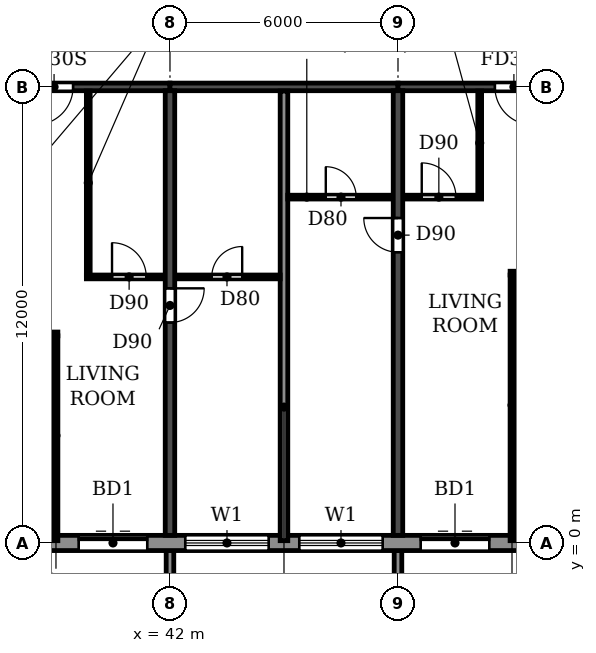
"""IFC4 building model, lengths in metres.
Left out: names, types, materials, properties, quantities, classifications, styles, units other than length and angle.
Written with IfcOpenShell. Run it as: python <this file> out.ifc"""

import sys

from ifc_helpers import new_model, si_unit, direction, frame, frame_2d, origin, place, context, subcontext, project, spatial, polyline, rectangle, outline, extrude, source, transform, mapped, element, fill, save


model = new_model("IFC4")
c1 = context("Model", 3, precision=1e-05, world=origin(), true_north=direction((0.0, 1.0)))
c2 = subcontext(c1, "Body", "Model", "MODEL_VIEW")
j1 = project(units=[si_unit("LENGTHUNIT", "METRE"), si_unit("PLANEANGLEUNIT", "RADIAN")], contexts=[c1])
p1 = place(None, origin())
s1 = spatial("IfcSite", under=j1, at=p1, CompositionType="ELEMENT")
p2 = place(p1, origin())
s2 = spatial("IfcBuilding", under=s1, at=p2, CompositionType="ELEMENT")
p3 = place(p2, frame((0.0, 0.0, 221.4)))
s3 = spatial("IfcBuildingStorey", under=s2, at=p3, CompositionType="ELEMENT", Elevation=221.4)
p4 = place(p3, frame((42.0, 0.2, 0.0), z_axis=(0.0, 0.0, 1.0), x_axis=(0.0, 1.0, 0.0)))
e1 = element("IfcWall", 1, at=p4, inside=s3, PredefinedType="SHEAR", context=c2, shape_type="SweptSolid", body=[
    extrude(rectangle(XDim=11.7, YDim=0.25, at=frame_2d((5.85, 0.0))), origin(), (0.0, 0.0, 1.0), 3.08),
])
p5 = place(p4, frame((5.6, 0.0, 0.0)))
e2 = element("IfcOpeningElement", 2, at=p5, cuts=e1, PredefinedType="OPENING", context=c2, shape_type="SweptSolid", body=[
    extrude(rectangle(XDim=0.9, YDim=2.1, at=frame_2d((0.45, 1.05))), frame((0.0, 0.135, 0.0), z_axis=(0.0, -1.0, 0.0), x_axis=(1.0, 0.0, 0.0)), (0.0, 0.0, 1.0), 0.27),
])
p6 = place(p3, frame((48.0, 0.2, 0.0), z_axis=(0.0, 0.0, 1.0), x_axis=(0.0, 1.0, 0.0)))
e3 = element("IfcWall", 3, at=p6, inside=s3, PredefinedType="SHEAR", context=c2, shape_type="SweptSolid", body=[
    extrude(rectangle(XDim=11.7, YDim=0.25, at=frame_2d((5.85, 0.0))), origin(), (0.0, 0.0, 1.0), 3.08),
])
p7 = place(p6, frame((7.45, 0.0, 0.0)))
e4 = element("IfcOpeningElement", 4, at=p7, cuts=e3, PredefinedType="OPENING", context=c2, shape_type="SweptSolid", body=[
    extrude(rectangle(XDim=0.9, YDim=2.1, at=frame_2d((0.45, 1.05))), frame((0.0, 0.135, 0.0), z_axis=(0.0, -1.0, 0.0), x_axis=(1.0, 0.0, 0.0)), (0.0, 0.0, 1.0), 0.27),
])
p8 = place(p3, frame((36.0, 12.0, 0.0), z_axis=(0.0, 0.0, 1.0), x_axis=(1.0, 0.0, 0.0)))
e5 = element("IfcWall", 5, at=p8, inside=s3, PredefinedType="SHEAR", context=c2, shape_type="SweptSolid", body=[
    extrude(rectangle(XDim=6.0, YDim=0.2, at=frame_2d((3.0, 0.0))), origin(), (0.0, 0.0, 1.0), 2.48),
])
p9 = place(p8, frame((2.45, 0.0, 0.0)))
e6 = element("IfcOpeningElement", 6, at=p9, cuts=e5, PredefinedType="OPENING", context=c2, shape_type="SweptSolid", body=[
    extrude(rectangle(XDim=1.0, YDim=2.1, at=frame_2d((0.5, 1.05))), frame((0.0, 0.11, 0.0), z_axis=(0.0, -1.0, 0.0), x_axis=(1.0, 0.0, 0.0)), (0.0, 0.0, 1.0), 0.22),
])
p10 = place(p3, frame((42.0, 12.0, 0.0), z_axis=(0.0, 0.0, 1.0), x_axis=(1.0, 0.0, 0.0)))
e7 = element("IfcWall", 7, at=p10, inside=s3, PredefinedType="SHEAR", context=c2, shape_type="SweptSolid", body=[
    extrude(rectangle(XDim=6.0, YDim=0.2, at=frame_2d((3.0, 0.0))), origin(), (0.0, 0.0, 1.0), 2.48),
])
p11 = place(p3, frame((48.0, 12.0, 0.0), z_axis=(0.0, 0.0, 1.0), x_axis=(1.0, 0.0, 0.0)))
e8 = element("IfcWall", 8, at=p11, inside=s3, PredefinedType="SHEAR", context=c2, shape_type="SweptSolid", body=[
    extrude(rectangle(XDim=6.0, YDim=0.2, at=frame_2d((3.0, 0.0))), origin(), (0.0, 0.0, 1.0), 2.48),
])
p12 = place(p11, frame((2.55, 0.0, 0.0)))
e9 = element("IfcOpeningElement", 9, at=p12, cuts=e8, PredefinedType="OPENING", context=c2, shape_type="SweptSolid", body=[
    extrude(rectangle(XDim=1.0, YDim=2.1, at=frame_2d((0.5, 1.05))), frame((0.0, 0.11, 0.0), z_axis=(0.0, -1.0, 0.0), x_axis=(1.0, 0.0, 0.0)), (0.0, 0.0, 1.0), 0.22),
])
p13 = place(p3, frame((22.683, 0.0, 0.0), z_axis=(0.0, 0.0, 1.0), x_axis=(1.0, 0.0, 0.0)))
e10 = element("IfcWall", 10, at=p13, inside=s3, PredefinedType="STANDARD", context=c2, shape_type="SweptSolid", body=[
    extrude(rectangle(XDim=56.634, YDim=0.4, at=frame_2d((28.317, 0.0))), origin(), (0.0, 0.0, 1.0), 3.08),
])
p14 = place(p13, frame((1.717, 0.0, 0.9)))
e11 = element("IfcOpeningElement", 11, at=p14, cuts=e10, PredefinedType="OPENING", context=c2, shape_type="SweptSolid", body=[
    extrude(rectangle(XDim=2.2, YDim=1.5, at=frame_2d((1.1, 0.75))), frame((0.0, 0.21, 0.0), z_axis=(0.0, -1.0, 0.0), x_axis=(1.0, 0.0, 0.0)), (0.0, 0.0, 1.0), 0.42),
])
p15 = place(p13, frame((4.917, 0.0, 0.0)))
e12 = element("IfcOpeningElement", 12, at=p15, cuts=e10, PredefinedType="OPENING", context=c2, shape_type="SweptSolid", body=[
    extrude(rectangle(XDim=1.8, YDim=2.4, at=frame_2d((0.9, 1.2))), frame((0.0, 0.21, 0.0), z_axis=(0.0, -1.0, 0.0), x_axis=(1.0, 0.0, 0.0)), (0.0, 0.0, 1.0), 0.42),
])
p16 = place(p13, frame((7.717, 0.0, 0.9)))
e13 = element("IfcOpeningElement", 13, at=p16, cuts=e10, PredefinedType="OPENING", context=c2, shape_type="SweptSolid", body=[
    extrude(rectangle(XDim=2.2, YDim=1.5, at=frame_2d((1.1, 0.75))), frame((0.0, 0.21, 0.0), z_axis=(0.0, -1.0, 0.0), x_axis=(1.0, 0.0, 0.0)), (0.0, 0.0, 1.0), 0.42),
])
p17 = place(p13, frame((10.717, 0.0, 0.9)))
e14 = element("IfcOpeningElement", 14, at=p17, cuts=e10, PredefinedType="OPENING", context=c2, shape_type="SweptSolid", body=[
    extrude(rectangle(XDim=2.2, YDim=1.5, at=frame_2d((1.1, 0.75))), frame((0.0, 0.21, 0.0), z_axis=(0.0, -1.0, 0.0), x_axis=(1.0, 0.0, 0.0)), (0.0, 0.0, 1.0), 0.42),
])
p18 = place(p13, frame((13.717, 0.0, 0.9)))
e15 = element("IfcOpeningElement", 15, at=p18, cuts=e10, PredefinedType="OPENING", context=c2, shape_type="SweptSolid", body=[
    extrude(rectangle(XDim=2.2, YDim=1.5, at=frame_2d((1.1, 0.75))), frame((0.0, 0.21, 0.0), z_axis=(0.0, -1.0, 0.0), x_axis=(1.0, 0.0, 0.0)), (0.0, 0.0, 1.0), 0.42),
])
p19 = place(p13, frame((16.917, 0.0, 0.0)))
e16 = element("IfcOpeningElement", 16, at=p19, cuts=e10, PredefinedType="OPENING", context=c2, shape_type="SweptSolid", body=[
    extrude(rectangle(XDim=1.8, YDim=2.4, at=frame_2d((0.9, 1.2))), frame((0.0, 0.21, 0.0), z_axis=(0.0, -1.0, 0.0), x_axis=(1.0, 0.0, 0.0)), (0.0, 0.0, 1.0), 0.42),
])
p20 = place(p13, frame((19.717, 0.0, 0.9)))
e17 = element("IfcOpeningElement", 17, at=p20, cuts=e10, PredefinedType="OPENING", context=c2, shape_type="SweptSolid", body=[
    extrude(rectangle(XDim=2.2, YDim=1.5, at=frame_2d((1.1, 0.75))), frame((0.0, 0.21, 0.0), z_axis=(0.0, -1.0, 0.0), x_axis=(1.0, 0.0, 0.0)), (0.0, 0.0, 1.0), 0.42),
])
p21 = place(p13, frame((22.717, 0.0, 0.9)))
e18 = element("IfcOpeningElement", 18, at=p21, cuts=e10, PredefinedType="OPENING", context=c2, shape_type="SweptSolid", body=[
    extrude(rectangle(XDim=2.2, YDim=1.5, at=frame_2d((1.1, 0.75))), frame((0.0, 0.21, 0.0), z_axis=(0.0, -1.0, 0.0), x_axis=(1.0, 0.0, 0.0)), (0.0, 0.0, 1.0), 0.42),
])
p22 = place(p13, frame((25.917, 0.0, 0.0)))
e19 = element("IfcOpeningElement", 19, at=p22, cuts=e10, PredefinedType="OPENING", context=c2, shape_type="SweptSolid", body=[
    extrude(rectangle(XDim=1.8, YDim=2.4, at=frame_2d((0.9, 1.2))), frame((0.0, 0.21, 0.0), z_axis=(0.0, -1.0, 0.0), x_axis=(1.0, 0.0, 0.0)), (0.0, 0.0, 1.0), 0.42),
])
p23 = place(p13, frame((28.717, 0.0, 0.9)))
e20 = element("IfcOpeningElement", 20, at=p23, cuts=e10, PredefinedType="OPENING", context=c2, shape_type="SweptSolid", body=[
    extrude(rectangle(XDim=2.2, YDim=1.5, at=frame_2d((1.1, 0.75))), frame((0.0, 0.21, 0.0), z_axis=(0.0, -1.0, 0.0), x_axis=(1.0, 0.0, 0.0)), (0.0, 0.0, 1.0), 0.42),
])
p24 = place(p13, frame((31.717, 0.0, 0.9)))
e21 = element("IfcOpeningElement", 21, at=p24, cuts=e10, PredefinedType="OPENING", context=c2, shape_type="SweptSolid", body=[
    extrude(rectangle(XDim=2.2, YDim=1.5, at=frame_2d((1.1, 0.75))), frame((0.0, 0.21, 0.0), z_axis=(0.0, -1.0, 0.0), x_axis=(1.0, 0.0, 0.0)), (0.0, 0.0, 1.0), 0.42),
])
p25 = place(p13, frame((34.717, 0.0, 0.9)))
e22 = element("IfcOpeningElement", 22, at=p25, cuts=e10, PredefinedType="OPENING", context=c2, shape_type="SweptSolid", body=[
    extrude(rectangle(XDim=2.2, YDim=1.5, at=frame_2d((1.1, 0.75))), frame((0.0, 0.21, 0.0), z_axis=(0.0, -1.0, 0.0), x_axis=(1.0, 0.0, 0.0)), (0.0, 0.0, 1.0), 0.42),
])
p26 = place(p13, frame((37.917, 0.0, 0.0)))
e23 = element("IfcOpeningElement", 23, at=p26, cuts=e10, PredefinedType="OPENING", context=c2, shape_type="SweptSolid", body=[
    extrude(rectangle(XDim=1.8, YDim=2.4, at=frame_2d((0.9, 1.2))), frame((0.0, 0.21, 0.0), z_axis=(0.0, -1.0, 0.0), x_axis=(1.0, 0.0, 0.0)), (0.0, 0.0, 1.0), 0.42),
])
p27 = place(p13, frame((40.717, 0.0, 0.9)))
e24 = element("IfcOpeningElement", 24, at=p27, cuts=e10, PredefinedType="OPENING", context=c2, shape_type="SweptSolid", body=[
    extrude(rectangle(XDim=2.2, YDim=1.5, at=frame_2d((1.1, 0.75))), frame((0.0, 0.21, 0.0), z_axis=(0.0, -1.0, 0.0), x_axis=(1.0, 0.0, 0.0)), (0.0, 0.0, 1.0), 0.42),
])
p28 = place(p13, frame((43.717, 0.0, 0.9)))
e25 = element("IfcOpeningElement", 25, at=p28, cuts=e10, PredefinedType="OPENING", context=c2, shape_type="SweptSolid", body=[
    extrude(rectangle(XDim=2.2, YDim=1.5, at=frame_2d((1.1, 0.75))), frame((0.0, 0.21, 0.0), z_axis=(0.0, -1.0, 0.0), x_axis=(1.0, 0.0, 0.0)), (0.0, 0.0, 1.0), 0.42),
])
p29 = place(p13, frame((46.717, 0.0, 0.9)))
e26 = element("IfcOpeningElement", 26, at=p29, cuts=e10, PredefinedType="OPENING", context=c2, shape_type="SweptSolid", body=[
    extrude(rectangle(XDim=2.2, YDim=1.5, at=frame_2d((1.1, 0.75))), frame((0.0, 0.21, 0.0), z_axis=(0.0, -1.0, 0.0), x_axis=(1.0, 0.0, 0.0)), (0.0, 0.0, 1.0), 0.42),
])
p30 = place(p13, frame((49.917, 0.0, 0.0)))
e27 = element("IfcOpeningElement", 27, at=p30, cuts=e10, PredefinedType="OPENING", context=c2, shape_type="SweptSolid", body=[
    extrude(rectangle(XDim=1.8, YDim=2.4, at=frame_2d((0.9, 1.2))), frame((0.0, 0.21, 0.0), z_axis=(0.0, -1.0, 0.0), x_axis=(1.0, 0.0, 0.0)), (0.0, 0.0, 1.0), 0.42),
])
p31 = place(p13, frame((52.717, 0.0, 0.9)))
e28 = element("IfcOpeningElement", 28, at=p31, cuts=e10, PredefinedType="OPENING", context=c2, shape_type="SweptSolid", body=[
    extrude(rectangle(XDim=2.2, YDim=1.5, at=frame_2d((1.1, 0.75))), frame((0.0, 0.21, 0.0), z_axis=(0.0, -1.0, 0.0), x_axis=(1.0, 0.0, 0.0)), (0.0, 0.0, 1.0), 0.42),
])
m1 = source(origin(), c2, "Body", "SweptSolid", [
    extrude(outline(polyline([(0.0, 0.0), (0.2, 0.0), (0.2, 1.65), (0.0, 1.65), (0.0, 0.0)])), origin(), (0.0, 0.0, 1.0), 3.1),
])
for number, where in (
    (29, (41.9, -1.85, 0.0)),
    (30, (47.9, -1.85, 0.0)),
):
    element("IfcWall", number, at=place(p3, frame(where)), inside=s3, PredefinedType="STANDARD", context=c2, shape_type="MappedRepresentation", body=[
        mapped(m1, transform((0.0, 0.0, 0.0))),
    ])
p32 = place(p3, frame((45.0, 0.06, 0.0), z_axis=(0.0, 0.0, 1.0), x_axis=(0.0, 1.0, 0.0)))
e31 = element("IfcWall", 31, at=p32, inside=s3, PredefinedType="PARTITIONING", context=c2, shape_type="SweptSolid", body=[
    extrude(rectangle(XDim=11.83, YDim=0.2, at=frame_2d((5.915, 0.0))), origin(), (0.0, 0.0, 1.0), 3.08),
])
p33 = place(p3, frame((36.135, 5.5, 0.0), z_axis=(0.0, 0.0, 1.0), x_axis=(1.0, 0.0, 0.0)))
e32 = element("IfcWall", 32, at=p33, inside=s3, PredefinedType="PARTITIONING", context=c2, shape_type="SweptSolid", body=[
    extrude(rectangle(XDim=2.915, YDim=0.1, at=frame_2d((1.458, 0.0))), origin(), (0.0, 0.0, 1.0), 3.08),
])
p34 = place(p33, frame((1.465, 0.0, 0.0)))
e33 = element("IfcOpeningElement", 33, at=p34, cuts=e32, PredefinedType="OPENING", context=c2, shape_type="SweptSolid", body=[
    extrude(rectangle(XDim=0.9, YDim=2.1, at=frame_2d((0.45, 1.05))), frame((0.0, 0.06, 0.0), z_axis=(0.0, -1.0, 0.0), x_axis=(1.0, 0.0, 0.0)), (0.0, 0.0, 1.0), 0.12),
])
p35 = place(p3, frame((39.8, 7.0, 0.0), z_axis=(0.0, 0.0, 1.0), x_axis=(1.0, 0.0, 0.0)))
e34 = element("IfcWall", 34, at=p35, inside=s3, PredefinedType="PARTITIONING", context=c2, shape_type="SweptSolid", body=[
    extrude(rectangle(XDim=2.065, YDim=0.1, at=frame_2d((1.032, 0.0))), origin(), (0.0, 0.0, 1.0), 3.08),
])
p36 = place(p35, frame((0.675, 0.0, 0.0)))
e35 = element("IfcOpeningElement", 35, at=p36, cuts=e34, PredefinedType="OPENING", context=c2, shape_type="SweptSolid", body=[
    extrude(rectangle(XDim=0.9, YDim=2.1, at=frame_2d((0.45, 1.05))), frame((0.0, 0.06, 0.0), z_axis=(0.0, -1.0, 0.0), x_axis=(1.0, 0.0, 0.0)), (0.0, 0.0, 1.0), 0.12),
])
p37 = place(p3, frame((42.135, 7.0, 0.0), z_axis=(0.0, 0.0, 1.0), x_axis=(1.0, 0.0, 0.0)))
e36 = element("IfcWall", 36, at=p37, inside=s3, PredefinedType="PARTITIONING", context=c2, shape_type="SweptSolid", body=[
    extrude(rectangle(XDim=2.765, YDim=0.1, at=frame_2d((1.382, 0.0))), origin(), (0.0, 0.0, 1.0), 3.08),
])
p38 = place(p37, frame((0.965, 0.0, 0.0)))
e37 = element("IfcOpeningElement", 37, at=p38, cuts=e36, PredefinedType="OPENING", context=c2, shape_type="SweptSolid", body=[
    extrude(rectangle(XDim=0.8, YDim=2.1, at=frame_2d((0.4, 1.05))), frame((0.0, 0.06, 0.0), z_axis=(0.0, -1.0, 0.0), x_axis=(1.0, 0.0, 0.0)), (0.0, 0.0, 1.0), 0.12),
])
p39 = place(p3, frame((50.95, 7.1, 0.0), z_axis=(0.0, 0.0, 1.0), x_axis=(1.0, 0.0, 0.0)))
e38 = element("IfcWall", 38, at=p39, inside=s3, PredefinedType="PARTITIONING", context=c2, shape_type="SweptSolid", body=[
    extrude(rectangle(XDim=2.915, YDim=0.1, at=frame_2d((1.458, 0.0))), origin(), (0.0, 0.0, 1.0), 3.08),
])
p40 = place(p39, frame((1.65, 0.0, 0.0)))
e39 = element("IfcOpeningElement", 39, at=p40, cuts=e38, PredefinedType="OPENING", context=c2, shape_type="SweptSolid", body=[
    extrude(rectangle(XDim=0.9, YDim=2.1, at=frame_2d((0.45, 1.05))), frame((0.0, 0.06, 0.0), z_axis=(0.0, -1.0, 0.0), x_axis=(1.0, 0.0, 0.0)), (0.0, 0.0, 1.0), 0.12),
])
p41 = place(p3, frame((45.1, 9.1, 0.0), z_axis=(0.0, 0.0, 1.0), x_axis=(1.0, 0.0, 0.0)))
e40 = element("IfcWall", 40, at=p41, inside=s3, PredefinedType="PARTITIONING", context=c2, shape_type="SweptSolid", body=[
    extrude(rectangle(XDim=2.765, YDim=0.1, at=frame_2d((1.382, 0.0))), origin(), (0.0, 0.0, 1.0), 3.08),
])
p42 = place(p41, frame((1.0, 0.0, 0.0)))
e41 = element("IfcOpeningElement", 41, at=p42, cuts=e40, PredefinedType="OPENING", context=c2, shape_type="SweptSolid", body=[
    extrude(rectangle(XDim=0.8, YDim=2.1, at=frame_2d((0.4, 1.05))), frame((0.0, 0.06, 0.0), z_axis=(0.0, -1.0, 0.0), x_axis=(1.0, 0.0, 0.0)), (0.0, 0.0, 1.0), 0.12),
])
p43 = place(p3, frame((48.135, 9.1, 0.0), z_axis=(0.0, 0.0, 1.0), x_axis=(1.0, 0.0, 0.0)))
e42 = element("IfcWall", 42, at=p43, inside=s3, PredefinedType="PARTITIONING", context=c2, shape_type="SweptSolid", body=[
    extrude(rectangle(XDim=2.065, YDim=0.1, at=frame_2d((1.032, 0.0))), origin(), (0.0, 0.0, 1.0), 3.08),
])
p44 = place(p43, frame((0.49, 0.0, 0.0)))
e43 = element("IfcOpeningElement", 43, at=p44, cuts=e42, PredefinedType="OPENING", context=c2, shape_type="SweptSolid", body=[
    extrude(rectangle(XDim=0.9, YDim=2.1, at=frame_2d((0.45, 1.05))), frame((0.0, 0.06, 0.0), z_axis=(0.0, -1.0, 0.0), x_axis=(1.0, 0.0, 0.0)), (0.0, 0.0, 1.0), 0.12),
])
p45 = place(p3, frame((39.0, 0.06, 0.0), z_axis=(0.0, 0.0, 1.0), x_axis=(0.0, 1.0, 0.0)))
e44 = element("IfcWall", 44, at=p45, inside=s3, PredefinedType="PARTITIONING", context=c2, shape_type="SweptSolid", body=[
    extrude(rectangle(XDim=5.39, YDim=0.1, at=frame_2d((2.695, 0.0))), origin(), (0.0, 0.0, 1.0), 3.08),
])
p46 = place(p3, frame((39.85, 7.05, 0.0), z_axis=(0.0, 0.0, 1.0), x_axis=(0.0, 1.0, 0.0)))
e45 = element("IfcWall", 45, at=p46, inside=s3, PredefinedType="PARTITIONING", context=c2, shape_type="SweptSolid", body=[
    extrude(rectangle(XDim=4.84, YDim=0.1, at=frame_2d((2.42, 0.0))), origin(), (0.0, 0.0, 1.0), 3.08),
])
p47 = place(p3, frame((50.15, 9.15, 0.0), z_axis=(0.0, 0.0, 1.0), x_axis=(0.0, 1.0, 0.0)))
e46 = element("IfcWall", 46, at=p47, inside=s3, PredefinedType="PARTITIONING", context=c2, shape_type="SweptSolid", body=[
    extrude(rectangle(XDim=2.74, YDim=0.1, at=frame_2d((1.37, 0.0))), origin(), (0.0, 0.0, 1.0), 3.08),
])
p48 = place(p3, frame((51.0, 0.06, 0.0), z_axis=(0.0, 0.0, 1.0), x_axis=(0.0, 1.0, 0.0)))
e47 = element("IfcWall", 47, at=p48, inside=s3, PredefinedType="PARTITIONING", context=c2, shape_type="SweptSolid", body=[
    extrude(rectangle(XDim=6.99, YDim=0.1, at=frame_2d((3.495, 0.0))), origin(), (0.0, 0.0, 1.0), 3.08),
])
p49 = place(p19, origin())
e48 = element("IfcDoor", 48, at=p49, inside=s3, OperationType="DOUBLE_DOOR_SLIDING", PredefinedType="DOOR", context=c2, shape_type="SweptSolid", body=[
    extrude(rectangle(XDim=1.8, YDim=2.4, at=frame_2d((0.9, 1.2))), frame((0.0, 0.025, 0.0), z_axis=(0.0, -1.0, 0.0), x_axis=(1.0, 0.0, 0.0)), (0.0, 0.0, 1.0), 0.05),
])
fill(e16, e48)
p50 = place(p20, origin())
e49 = element("IfcWindow", 49, at=p50, inside=s3, PartitioningType="DOUBLE_PANEL_HORIZONTAL", PredefinedType="WINDOW", context=c2, shape_type="SweptSolid", body=[
    extrude(rectangle(XDim=2.2, YDim=1.5, at=frame_2d((1.1, 0.75))), frame((0.0, 0.03, 0.0), z_axis=(0.0, -1.0, 0.0), x_axis=(1.0, 0.0, 0.0)), (0.0, 0.0, 1.0), 0.06),
])
fill(e17, e49)
p51 = place(p21, origin())
e50 = element("IfcWindow", 50, at=p51, inside=s3, PartitioningType="DOUBLE_PANEL_HORIZONTAL", PredefinedType="WINDOW", context=c2, shape_type="SweptSolid", body=[
    extrude(rectangle(XDim=2.2, YDim=1.5, at=frame_2d((1.1, 0.75))), frame((0.0, 0.03, 0.0), z_axis=(0.0, -1.0, 0.0), x_axis=(1.0, 0.0, 0.0)), (0.0, 0.0, 1.0), 0.06),
])
fill(e18, e50)
p52 = place(p22, origin())
e51 = element("IfcDoor", 51, at=p52, inside=s3, OperationType="DOUBLE_DOOR_SLIDING", PredefinedType="DOOR", context=c2, shape_type="SweptSolid", body=[
    extrude(rectangle(XDim=1.8, YDim=2.4, at=frame_2d((0.9, 1.2))), frame((0.0, 0.025, 0.0), z_axis=(0.0, -1.0, 0.0), x_axis=(1.0, 0.0, 0.0)), (0.0, 0.0, 1.0), 0.05),
])
fill(e19, e51)
p53 = place(p38, origin())
e52 = element("IfcDoor", 52, at=p53, inside=s3, OperationType="SINGLE_SWING_RIGHT", PredefinedType="DOOR", context=c2, shape_type="SweptSolid", body=[
    extrude(rectangle(XDim=0.8, YDim=2.1, at=frame_2d((0.4, 1.05))), frame((0.0, 0.025, 0.0), z_axis=(0.0, -1.0, 0.0), x_axis=(1.0, 0.0, 0.0)), (0.0, 0.0, 1.0), 0.05),
])
fill(e37, e52)
p54 = place(p9, frame((1.0, 0.0, 0.0), z_axis=(0.0, 0.0, 1.0), x_axis=(-1.0, 0.0, 0.0)))
e53 = element("IfcDoor", 53, at=p54, inside=s3, OperationType="SINGLE_SWING_RIGHT", PredefinedType="DOOR", context=c2, shape_type="SweptSolid", body=[
    extrude(rectangle(XDim=1.0, YDim=2.1, at=frame_2d((0.5, 1.05))), frame((0.0, 0.025, 0.0), z_axis=(0.0, -1.0, 0.0), x_axis=(1.0, 0.0, 0.0)), (0.0, 0.0, 1.0), 0.05),
])
fill(e6, e53)
p55 = place(p36, origin())
e54 = element("IfcDoor", 54, at=p55, inside=s3, OperationType="SINGLE_SWING_LEFT", PredefinedType="DOOR", context=c2, shape_type="SweptSolid", body=[
    extrude(rectangle(XDim=0.9, YDim=2.1, at=frame_2d((0.45, 1.05))), frame((0.0, 0.025, 0.0), z_axis=(0.0, -1.0, 0.0), x_axis=(1.0, 0.0, 0.0)), (0.0, 0.0, 1.0), 0.05),
])
fill(e35, e54)
p56 = place(p5, frame((0.9, 0.0, 0.0), z_axis=(0.0, 0.0, 1.0), x_axis=(-1.0, 0.0, 0.0)))
e55 = element("IfcDoor", 55, at=p56, inside=s3, OperationType="SINGLE_SWING_LEFT", PredefinedType="DOOR", context=c2, shape_type="SweptSolid", body=[
    extrude(rectangle(XDim=0.9, YDim=2.1, at=frame_2d((0.45, 1.05))), frame((0.0, 0.025, 0.0), z_axis=(0.0, -1.0, 0.0), x_axis=(1.0, 0.0, 0.0)), (0.0, 0.0, 1.0), 0.05),
])
fill(e2, e55)
p57 = place(p42, origin())
e56 = element("IfcDoor", 56, at=p57, inside=s3, OperationType="SINGLE_SWING_LEFT", PredefinedType="DOOR", context=c2, shape_type="SweptSolid", body=[
    extrude(rectangle(XDim=0.8, YDim=2.1, at=frame_2d((0.4, 1.05))), frame((0.0, 0.025, 0.0), z_axis=(0.0, -1.0, 0.0), x_axis=(1.0, 0.0, 0.0)), (0.0, 0.0, 1.0), 0.05),
])
fill(e41, e56)
p58 = place(p7, origin())
e57 = element("IfcDoor", 57, at=p58, inside=s3, OperationType="SINGLE_SWING_RIGHT", PredefinedType="DOOR", context=c2, shape_type="SweptSolid", body=[
    extrude(rectangle(XDim=0.9, YDim=2.1, at=frame_2d((0.45, 1.05))), frame((0.0, 0.025, 0.0), z_axis=(0.0, -1.0, 0.0), x_axis=(1.0, 0.0, 0.0)), (0.0, 0.0, 1.0), 0.05),
])
fill(e4, e57)
p59 = place(p44, origin())
e58 = element("IfcDoor", 58, at=p59, inside=s3, OperationType="SINGLE_SWING_LEFT", PredefinedType="DOOR", context=c2, shape_type="SweptSolid", body=[
    extrude(rectangle(XDim=0.9, YDim=2.1, at=frame_2d((0.45, 1.05))), frame((0.0, 0.025, 0.0), z_axis=(0.0, -1.0, 0.0), x_axis=(1.0, 0.0, 0.0)), (0.0, 0.0, 1.0), 0.05),
])
fill(e43, e58)
p60 = place(p12, frame((1.0, 0.0, 0.0), z_axis=(0.0, 0.0, 1.0), x_axis=(-1.0, 0.0, 0.0)))
e59 = element("IfcDoor", 59, at=p60, inside=s3, OperationType="SINGLE_SWING_LEFT", PredefinedType="DOOR", context=c2, shape_type="SweptSolid", body=[
    extrude(rectangle(XDim=1.0, YDim=2.1, at=frame_2d((0.5, 1.05))), frame((0.0, 0.025, 0.0), z_axis=(0.0, -1.0, 0.0), x_axis=(1.0, 0.0, 0.0)), (0.0, 0.0, 1.0), 0.05),
])
fill(e9, e59)
save(model, sys.argv[1])
